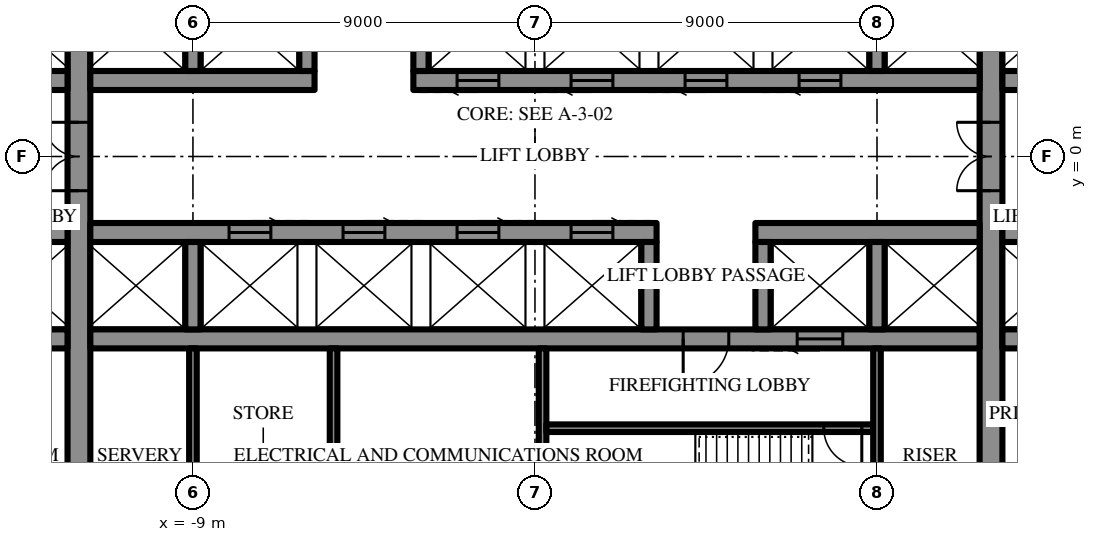
"""IFC4 building model, lengths in metres.
Left out: names, types, materials, properties, quantities, classifications, styles, units other than length and angle.
Written with IfcOpenShell. Run it as: python <this file> out.ifc"""

import sys

from ifc_helpers import new_model, si_unit, direction, frame, frame_2d, origin, place, context, subcontext, project, spatial, rectangle, extrude, element, fill, save


model = new_model("IFC4")
c1 = context("Model", 3, precision=1e-05, world=origin(), true_north=direction((0.0, 1.0)))
c2 = subcontext(c1, "Body", "Model", "MODEL_VIEW")
j1 = project(units=[si_unit("LENGTHUNIT", "METRE"), si_unit("PLANEANGLEUNIT", "RADIAN")], contexts=[c1])
p1 = place(None, origin())
s1 = spatial("IfcSite", under=j1, at=p1, CompositionType="ELEMENT")
p2 = place(p1, origin())
s2 = spatial("IfcBuilding", under=s1, at=p2, CompositionType="ELEMENT")
p3 = place(p2, frame((0.0, 0.0, 136.3)))
s3 = spatial("IfcBuildingStorey", under=s2, at=p3, CompositionType="ELEMENT", Elevation=136.3)
p4 = place(p3, frame((12.0, -10.7, 0.0), z_axis=(0.0, 0.0, 1.0), x_axis=(0.0, 1.0, 0.0)))
e1 = element("IfcWall", 1, at=p4, inside=s3, PredefinedType="SHEAR", context=c2, shape_type="SweptSolid", body=[
    extrude(rectangle(XDim=21.4, YDim=0.6, at=frame_2d((10.7, 0.0))), origin(), (0.0, 0.0, 1.0), 4.2),
])
p5 = place(p4, frame((9.8, 0.0, 0.0)))
e2 = element("IfcOpeningElement", 2, at=p5, cuts=e1, PredefinedType="OPENING", context=c2, shape_type="SweptSolid", body=[
    extrude(rectangle(XDim=1.8, YDim=2.4, at=frame_2d((0.9, 1.2))), frame((0.0, 0.31, 0.0), z_axis=(0.0, -1.0, 0.0), x_axis=(1.0, 0.0, 0.0)), (0.0, 0.0, 1.0), 0.62),
])
p6 = place(p3, frame((-12.0, -10.7, 0.0), z_axis=(0.0, 0.0, 1.0), x_axis=(0.0, 1.0, 0.0)))
e3 = element("IfcWall", 3, at=p6, inside=s3, PredefinedType="SHEAR", context=c2, shape_type="SweptSolid", body=[
    extrude(rectangle(XDim=21.4, YDim=0.6, at=frame_2d((10.7, 0.0))), origin(), (0.0, 0.0, 1.0), 4.2),
])
p7 = place(p6, frame((9.8, 0.0, 0.0)))
e4 = element("IfcOpeningElement", 4, at=p7, cuts=e3, PredefinedType="OPENING", context=c2, shape_type="SweptSolid", body=[
    extrude(rectangle(XDim=1.8, YDim=2.4, at=frame_2d((0.9, 1.2))), frame((0.0, 0.31, 0.0), z_axis=(0.0, -1.0, 0.0), x_axis=(1.0, 0.0, 0.0)), (0.0, 0.0, 1.0), 0.62),
])
p8 = place(p3, frame((-14.7, 2.0, 0.0), z_axis=(0.0, 0.0, 1.0), x_axis=(1.0, 0.0, 0.0)))
e5 = element("IfcWall", 5, at=p8, inside=s3, PredefinedType="SHEAR", context=c2, shape_type="SweptSolid", body=[
    extrude(rectangle(XDim=2.4, YDim=0.5, at=frame_2d((1.2, 0.0))), origin(), (0.0, 0.0, 1.0), 4.2),
])
p9 = place(p3, frame((-11.7, 2.0, 0.0), z_axis=(0.0, 0.0, 1.0), x_axis=(1.0, 0.0, 0.0)))
e6 = element("IfcWall", 6, at=p9, inside=s3, PredefinedType="SHEAR", context=c2, shape_type="SweptSolid", body=[
    extrude(rectangle(XDim=5.9, YDim=0.5, at=frame_2d((2.95, 0.0))), origin(), (0.0, 0.0, 1.0), 4.2),
])
p10 = place(p3, frame((-3.2, 2.0, 0.0), z_axis=(0.0, 0.0, 1.0), x_axis=(1.0, 0.0, 0.0)))
e7 = element("IfcWall", 7, at=p10, inside=s3, PredefinedType="SHEAR", context=c2, shape_type="SweptSolid", body=[
    extrude(rectangle(XDim=14.9, YDim=0.5, at=frame_2d((7.45, 0.0))), origin(), (0.0, 0.0, 1.0), 4.2),
])
p11 = place(p10, frame((1.15, 0.0, 0.0)))
e8 = element("IfcOpeningElement", 8, at=p11, cuts=e7, PredefinedType="OPENING", context=c2, shape_type="SweptSolid", body=[
    extrude(rectangle(XDim=1.1, YDim=2.2, at=frame_2d((0.55, 1.1))), frame((0.0, 0.26, 0.0), z_axis=(0.0, -1.0, 0.0), x_axis=(1.0, 0.0, 0.0)), (0.0, 0.0, 1.0), 0.52),
])
p12 = place(p10, frame((4.15, 0.0, 0.0)))
e9 = element("IfcOpeningElement", 9, at=p12, cuts=e7, PredefinedType="OPENING", context=c2, shape_type="SweptSolid", body=[
    extrude(rectangle(XDim=1.1, YDim=2.2, at=frame_2d((0.55, 1.1))), frame((0.0, 0.26, 0.0), z_axis=(0.0, -1.0, 0.0), x_axis=(1.0, 0.0, 0.0)), (0.0, 0.0, 1.0), 0.52),
])
p13 = place(p10, frame((7.15, 0.0, 0.0)))
e10 = element("IfcOpeningElement", 10, at=p13, cuts=e7, PredefinedType="OPENING", context=c2, shape_type="SweptSolid", body=[
    extrude(rectangle(XDim=1.1, YDim=2.2, at=frame_2d((0.55, 1.1))), frame((0.0, 0.26, 0.0), z_axis=(0.0, -1.0, 0.0), x_axis=(1.0, 0.0, 0.0)), (0.0, 0.0, 1.0), 0.52),
])
p14 = place(p10, frame((10.15, 0.0, 0.0)))
e11 = element("IfcOpeningElement", 11, at=p14, cuts=e7, PredefinedType="OPENING", context=c2, shape_type="SweptSolid", body=[
    extrude(rectangle(XDim=1.1, YDim=2.2, at=frame_2d((0.55, 1.1))), frame((0.0, 0.26, 0.0), z_axis=(0.0, -1.0, 0.0), x_axis=(1.0, 0.0, 0.0)), (0.0, 0.0, 1.0), 0.52),
])
p15 = place(p3, frame((12.3, 2.0, 0.0), z_axis=(0.0, 0.0, 1.0), x_axis=(1.0, 0.0, 0.0)))
e12 = element("IfcWall", 12, at=p15, inside=s3, PredefinedType="SHEAR", context=c2, shape_type="SweptSolid", body=[
    extrude(rectangle(XDim=2.4, YDim=0.5, at=frame_2d((1.2, 0.0))), origin(), (0.0, 0.0, 1.0), 4.2),
])
for number, where, z_axis, x_axis in (
    (13, (-9.0, 2.25, 0.0), (0.0, 0.0, 1.0), (0.0, 1.0, 0.0)),
    (14, (-6.0, 2.25, 0.0), (0.0, 0.0, 1.0), (0.0, 1.0, 0.0)),
    (15, (-3.0, 2.25, 0.0), (0.0, 0.0, 1.0), (0.0, 1.0, 0.0)),
    (16, (9.0, 2.25, 0.0), (0.0, 0.0, 1.0), (0.0, 1.0, 0.0)),
):
    element("IfcWall", number, at=place(p3, frame(where, z_axis=z_axis, x_axis=x_axis)), inside=s3, PredefinedType="SHEAR", context=c2, shape_type="SweptSolid", body=[
        extrude(rectangle(XDim=2.3, YDim=0.4, at=frame_2d((1.15, 0.0))), origin(), (0.0, 0.0, 1.0), 4.2),
    ])
p16 = place(p3, frame((14.7, -2.0, 0.0), z_axis=(0.0, 0.0, 1.0), x_axis=(-1.0, 0.0, 0.0)))
e17 = element("IfcWall", 17, at=p16, inside=s3, PredefinedType="SHEAR", context=c2, shape_type="SweptSolid", body=[
    extrude(rectangle(XDim=2.4, YDim=0.5, at=frame_2d((1.2, 0.0))), origin(), (0.0, 0.0, 1.0), 4.2),
])
p17 = place(p3, frame((11.7, -2.0, 0.0), z_axis=(0.0, 0.0, 1.0), x_axis=(-1.0, 0.0, 0.0)))
e18 = element("IfcWall", 18, at=p17, inside=s3, PredefinedType="SHEAR", context=c2, shape_type="SweptSolid", body=[
    extrude(rectangle(XDim=5.9, YDim=0.5, at=frame_2d((2.95, 0.0))), origin(), (0.0, 0.0, 1.0), 4.2),
])
p18 = place(p3, frame((3.2, -2.0, 0.0), z_axis=(0.0, 0.0, 1.0), x_axis=(-1.0, 0.0, 0.0)))
e19 = element("IfcWall", 19, at=p18, inside=s3, PredefinedType="SHEAR", context=c2, shape_type="SweptSolid", body=[
    extrude(rectangle(XDim=14.9, YDim=0.5, at=frame_2d((7.45, 0.0))), origin(), (0.0, 0.0, 1.0), 4.2),
])
p19 = place(p18, frame((1.15, 0.0, 0.0)))
e20 = element("IfcOpeningElement", 20, at=p19, cuts=e19, PredefinedType="OPENING", context=c2, shape_type="SweptSolid", body=[
    extrude(rectangle(XDim=1.1, YDim=2.2, at=frame_2d((0.55, 1.1))), frame((0.0, 0.26, 0.0), z_axis=(0.0, -1.0, 0.0), x_axis=(1.0, 0.0, 0.0)), (0.0, 0.0, 1.0), 0.52),
])
p20 = place(p18, frame((4.15, 0.0, 0.0)))
e21 = element("IfcOpeningElement", 21, at=p20, cuts=e19, PredefinedType="OPENING", context=c2, shape_type="SweptSolid", body=[
    extrude(rectangle(XDim=1.1, YDim=2.2, at=frame_2d((0.55, 1.1))), frame((0.0, 0.26, 0.0), z_axis=(0.0, -1.0, 0.0), x_axis=(1.0, 0.0, 0.0)), (0.0, 0.0, 1.0), 0.52),
])
p21 = place(p18, frame((7.15, 0.0, 0.0)))
e22 = element("IfcOpeningElement", 22, at=p21, cuts=e19, PredefinedType="OPENING", context=c2, shape_type="SweptSolid", body=[
    extrude(rectangle(XDim=1.1, YDim=2.2, at=frame_2d((0.55, 1.1))), frame((0.0, 0.26, 0.0), z_axis=(0.0, -1.0, 0.0), x_axis=(1.0, 0.0, 0.0)), (0.0, 0.0, 1.0), 0.52),
])
p22 = place(p18, frame((10.15, 0.0, 0.0)))
e23 = element("IfcOpeningElement", 23, at=p22, cuts=e19, PredefinedType="OPENING", context=c2, shape_type="SweptSolid", body=[
    extrude(rectangle(XDim=1.1, YDim=2.2, at=frame_2d((0.55, 1.1))), frame((0.0, 0.26, 0.0), z_axis=(0.0, -1.0, 0.0), x_axis=(1.0, 0.0, 0.0)), (0.0, 0.0, 1.0), 0.52),
])
for number, where, z_axis, x_axis in (
    (24, (-12.3, -2.0, 0.0), (0.0, 0.0, 1.0), (-1.0, 0.0, 0.0)),
    (25, (14.7, -4.8, 0.0), (0.0, 0.0, 1.0), (-1.0, 0.0, 0.0)),
):
    element("IfcWall", number, at=place(p3, frame(where, z_axis=z_axis, x_axis=x_axis)), inside=s3, PredefinedType="SHEAR", context=c2, shape_type="SweptSolid", body=[
        extrude(rectangle(XDim=2.4, YDim=0.5, at=frame_2d((1.2, 0.0))), origin(), (0.0, 0.0, 1.0), 4.2),
    ])
p23 = place(p3, frame((11.7, -4.8, 0.0), z_axis=(0.0, 0.0, 1.0), x_axis=(-1.0, 0.0, 0.0)))
e26 = element("IfcWall", 26, at=p23, inside=s3, PredefinedType="SHEAR", context=c2, shape_type="SweptSolid", body=[
    extrude(rectangle(XDim=23.4, YDim=0.5, at=frame_2d((11.7, 0.0))), origin(), (0.0, 0.0, 1.0), 4.2),
])
p24 = place(p23, frame((6.6, 0.0, 0.0)))
e27 = element("IfcOpeningElement", 27, at=p24, cuts=e26, PredefinedType="OPENING", context=c2, shape_type="SweptSolid", body=[
    extrude(rectangle(XDim=1.2, YDim=2.2, at=frame_2d((0.6, 1.1))), frame((0.0, 0.26, 0.0), z_axis=(0.0, -1.0, 0.0), x_axis=(1.0, 0.0, 0.0)), (0.0, 0.0, 1.0), 0.52),
])
p25 = place(p23, frame((3.6, 0.0, 0.0)))
e28 = element("IfcOpeningElement", 28, at=p25, cuts=e26, PredefinedType="OPENING", context=c2, shape_type="SweptSolid", body=[
    extrude(rectangle(XDim=1.2, YDim=2.2, at=frame_2d((0.6, 1.1))), frame((0.0, 0.26, 0.0), z_axis=(0.0, -1.0, 0.0), x_axis=(1.0, 0.0, 0.0)), (0.0, 0.0, 1.0), 0.52),
])
p26 = place(p3, frame((-12.3, -4.8, 0.0), z_axis=(0.0, 0.0, 1.0), x_axis=(-1.0, 0.0, 0.0)))
e29 = element("IfcWall", 29, at=p26, inside=s3, PredefinedType="SHEAR", context=c2, shape_type="SweptSolid", body=[
    extrude(rectangle(XDim=2.4, YDim=0.5, at=frame_2d((1.2, 0.0))), origin(), (0.0, 0.0, 1.0), 4.2),
])
for number, where, z_axis, x_axis in (
    (30, (9.0, -2.25, 0.0), (0.0, 0.0, 1.0), (0.0, -1.0, 0.0)),
    (31, (6.0, -2.25, 0.0), (0.0, 0.0, 1.0), (0.0, -1.0, 0.0)),
    (32, (3.0, -2.25, 0.0), (0.0, 0.0, 1.0), (0.0, -1.0, 0.0)),
    (33, (-9.0, -2.25, 0.0), (0.0, 0.0, 1.0), (0.0, -1.0, 0.0)),
):
    element("IfcWall", number, at=place(p3, frame(where, z_axis=z_axis, x_axis=x_axis)), inside=s3, PredefinedType="SHEAR", context=c2, shape_type="SweptSolid", body=[
        extrude(rectangle(XDim=2.3, YDim=0.4, at=frame_2d((1.15, 0.0))), origin(), (0.0, 0.0, 1.0), 4.2),
    ])
p27 = place(p3, frame((0.2, -5.05, 0.0), z_axis=(0.0, 0.0, 1.0), x_axis=(0.0, -1.0, 0.0)))
e34 = element("IfcWall", 34, at=p27, inside=s3, PredefinedType="SHEAR", context=c2, shape_type="SweptSolid", body=[
    extrude(rectangle(XDim=5.65, YDim=0.2, at=frame_2d((2.825, 0.0))), origin(), (0.0, 0.0, 1.0), 4.2),
])
p28 = place(p3, frame((8.9, -7.15, 0.0), z_axis=(0.0, 0.0, 1.0), x_axis=(-1.0, 0.0, 0.0)))
e35 = element("IfcWall", 35, at=p28, inside=s3, PredefinedType="SHEAR", context=c2, shape_type="SweptSolid", body=[
    extrude(rectangle(XDim=8.6, YDim=0.2, at=frame_2d((4.3, 0.0))), origin(), (0.0, 0.0, 1.0), 4.2),
])
p29 = place(p28, frame((0.3, 0.0, 0.0)))
e36 = element("IfcOpeningElement", 36, at=p29, cuts=e35, PredefinedType="OPENING", context=c2, shape_type="SweptSolid", body=[
    extrude(rectangle(XDim=1.0, YDim=2.2, at=frame_2d((0.5, 1.1))), frame((0.0, 0.11, 0.0), z_axis=(0.0, -1.0, 0.0), x_axis=(1.0, 0.0, 0.0)), (0.0, 0.0, 1.0), 0.22),
])
for number, where, z_axis, x_axis in (
    (37, (9.0, -5.05, 0.0), (0.0, 0.0, 1.0), (0.0, -1.0, 0.0)),
    (38, (-9.0, -5.05, 0.0), (0.0, 0.0, 1.0), (0.0, -1.0, 0.0)),
    (39, (-5.3, -5.05, 0.0), (0.0, 0.0, 1.0), (0.0, -1.0, 0.0)),
):
    element("IfcWall", number, at=place(p3, frame(where, z_axis=z_axis, x_axis=x_axis)), inside=s3, PredefinedType="PARTITIONING", context=c2, shape_type="SweptSolid", body=[
        extrude(rectangle(XDim=5.65, YDim=0.2, at=frame_2d((2.825, 0.0))), origin(), (0.0, 0.0, 1.0), 4.0),
    ])
p30 = place(p24, origin())
e40 = element("IfcDoor", 40, at=p30, inside=s3, OperationType="SINGLE_SWING_LEFT", PredefinedType="DOOR", context=c2, shape_type="SweptSolid", body=[
    extrude(rectangle(XDim=1.2, YDim=2.2, at=frame_2d((0.6, 1.1))), frame((0.0, 0.025, 0.0), z_axis=(0.0, -1.0, 0.0), x_axis=(1.0, 0.0, 0.0)), (0.0, 0.0, 1.0), 0.05),
])
fill(e27, e40)
p31 = place(p29, origin())
e41 = element("IfcDoor", 41, at=p31, inside=s3, OperationType="SINGLE_SWING_RIGHT", PredefinedType="DOOR", context=c2, shape_type="SweptSolid", body=[
    extrude(rectangle(XDim=1.0, YDim=2.2, at=frame_2d((0.5, 1.1))), frame((0.0, 0.025, 0.0), z_axis=(0.0, -1.0, 0.0), x_axis=(1.0, 0.0, 0.0)), (0.0, 0.0, 1.0), 0.05),
])
fill(e36, e41)
p32 = place(p5, origin())
e42 = element("IfcDoor", 42, at=p32, inside=s3, OperationType="DOUBLE_DOOR_SINGLE_SWING", PredefinedType="DOOR", context=c2, shape_type="SweptSolid", body=[
    extrude(rectangle(XDim=1.8, YDim=2.4, at=frame_2d((0.9, 1.2))), frame((0.0, 0.025, 0.0), z_axis=(0.0, -1.0, 0.0), x_axis=(1.0, 0.0, 0.0)), (0.0, 0.0, 1.0), 0.05),
])
fill(e2, e42)
p33 = place(p7, origin())
e43 = element("IfcDoor", 43, at=p33, inside=s3, OperationType="DOUBLE_DOOR_SINGLE_SWING", PredefinedType="DOOR", context=c2, shape_type="SweptSolid", body=[
    extrude(rectangle(XDim=1.8, YDim=2.4, at=frame_2d((0.9, 1.2))), frame((0.0, 0.025, 0.0), z_axis=(0.0, -1.0, 0.0), x_axis=(1.0, 0.0, 0.0)), (0.0, 0.0, 1.0), 0.05),
])
fill(e4, e43)
p34 = place(p11, frame((1.1, 0.0, 0.0), z_axis=(0.0, 0.0, 1.0), x_axis=(-1.0, 0.0, 0.0)))
e44 = element("IfcDoor", 44, at=p34, inside=s3, OperationType="SLIDING_TO_LEFT", PredefinedType="DOOR", context=c2, shape_type="SweptSolid", body=[
    extrude(rectangle(XDim=1.1, YDim=2.2, at=frame_2d((0.55, 1.1))), frame((0.0, 0.025, 0.0), z_axis=(0.0, -1.0, 0.0), x_axis=(1.0, 0.0, 0.0)), (0.0, 0.0, 1.0), 0.05),
])
fill(e8, e44)
p35 = place(p12, frame((1.1, 0.0, 0.0), z_axis=(0.0, 0.0, 1.0), x_axis=(-1.0, 0.0, 0.0)))
e45 = element("IfcDoor", 45, at=p35, inside=s3, OperationType="SLIDING_TO_LEFT", PredefinedType="DOOR", context=c2, shape_type="SweptSolid", body=[
    extrude(rectangle(XDim=1.1, YDim=2.2, at=frame_2d((0.55, 1.1))), frame((0.0, 0.025, 0.0), z_axis=(0.0, -1.0, 0.0), x_axis=(1.0, 0.0, 0.0)), (0.0, 0.0, 1.0), 0.05),
])
fill(e9, e45)
p36 = place(p13, frame((1.1, 0.0, 0.0), z_axis=(0.0, 0.0, 1.0), x_axis=(-1.0, 0.0, 0.0)))
e46 = element("IfcDoor", 46, at=p36, inside=s3, OperationType="SLIDING_TO_LEFT", PredefinedType="DOOR", context=c2, shape_type="SweptSolid", body=[
    extrude(rectangle(XDim=1.1, YDim=2.2, at=frame_2d((0.55, 1.1))), frame((0.0, 0.025, 0.0), z_axis=(0.0, -1.0, 0.0), x_axis=(1.0, 0.0, 0.0)), (0.0, 0.0, 1.0), 0.05),
])
fill(e10, e46)
p37 = place(p14, frame((1.1, 0.0, 0.0), z_axis=(0.0, 0.0, 1.0), x_axis=(-1.0, 0.0, 0.0)))
e47 = element("IfcDoor", 47, at=p37, inside=s3, OperationType="SLIDING_TO_LEFT", PredefinedType="DOOR", context=c2, shape_type="SweptSolid", body=[
    extrude(rectangle(XDim=1.1, YDim=2.2, at=frame_2d((0.55, 1.1))), frame((0.0, 0.025, 0.0), z_axis=(0.0, -1.0, 0.0), x_axis=(1.0, 0.0, 0.0)), (0.0, 0.0, 1.0), 0.05),
])
fill(e11, e47)
p38 = place(p25, origin())
e48 = element("IfcDoor", 48, at=p38, inside=s3, OperationType="SLIDING_TO_LEFT", PredefinedType="DOOR", context=c2, shape_type="SweptSolid", body=[
    extrude(rectangle(XDim=1.2, YDim=2.2, at=frame_2d((0.6, 1.1))), frame((0.0, 0.025, 0.0), z_axis=(0.0, -1.0, 0.0), x_axis=(1.0, 0.0, 0.0)), (0.0, 0.0, 1.0), 0.05),
])
fill(e28, e48)
p39 = place(p19, frame((1.1, 0.0, 0.0), z_axis=(0.0, 0.0, 1.0), x_axis=(-1.0, 0.0, 0.0)))
e49 = element("IfcDoor", 49, at=p39, inside=s3, OperationType="SLIDING_TO_LEFT", PredefinedType="DOOR", context=c2, shape_type="SweptSolid", body=[
    extrude(rectangle(XDim=1.1, YDim=2.2, at=frame_2d((0.55, 1.1))), frame((0.0, 0.025, 0.0), z_axis=(0.0, -1.0, 0.0), x_axis=(1.0, 0.0, 0.0)), (0.0, 0.0, 1.0), 0.05),
])
fill(e20, e49)
p40 = place(p20, frame((1.1, 0.0, 0.0), z_axis=(0.0, 0.0, 1.0), x_axis=(-1.0, 0.0, 0.0)))
e50 = element("IfcDoor", 50, at=p40, inside=s3, OperationType="SLIDING_TO_LEFT", PredefinedType="DOOR", context=c2, shape_type="SweptSolid", body=[
    extrude(rectangle(XDim=1.1, YDim=2.2, at=frame_2d((0.55, 1.1))), frame((0.0, 0.025, 0.0), z_axis=(0.0, -1.0, 0.0), x_axis=(1.0, 0.0, 0.0)), (0.0, 0.0, 1.0), 0.05),
])
fill(e21, e50)
p41 = place(p21, frame((1.1, 0.0, 0.0), z_axis=(0.0, 0.0, 1.0), x_axis=(-1.0, 0.0, 0.0)))
e51 = element("IfcDoor", 51, at=p41, inside=s3, OperationType="SLIDING_TO_LEFT", PredefinedType="DOOR", context=c2, shape_type="SweptSolid", body=[
    extrude(rectangle(XDim=1.1, YDim=2.2, at=frame_2d((0.55, 1.1))), frame((0.0, 0.025, 0.0), z_axis=(0.0, -1.0, 0.0), x_axis=(1.0, 0.0, 0.0)), (0.0, 0.0, 1.0), 0.05),
])
fill(e22, e51)
p42 = place(p22, frame((1.1, 0.0, 0.0), z_axis=(0.0, 0.0, 1.0), x_axis=(-1.0, 0.0, 0.0)))
e52 = element("IfcDoor", 52, at=p42, inside=s3, OperationType="SLIDING_TO_LEFT", PredefinedType="DOOR", context=c2, shape_type="SweptSolid", body=[
    extrude(rectangle(XDim=1.1, YDim=2.2, at=frame_2d((0.55, 1.1))), frame((0.0, 0.025, 0.0), z_axis=(0.0, -1.0, 0.0), x_axis=(1.0, 0.0, 0.0)), (0.0, 0.0, 1.0), 0.05),
])
fill(e23, e52)
save(model, sys.argv[1])
